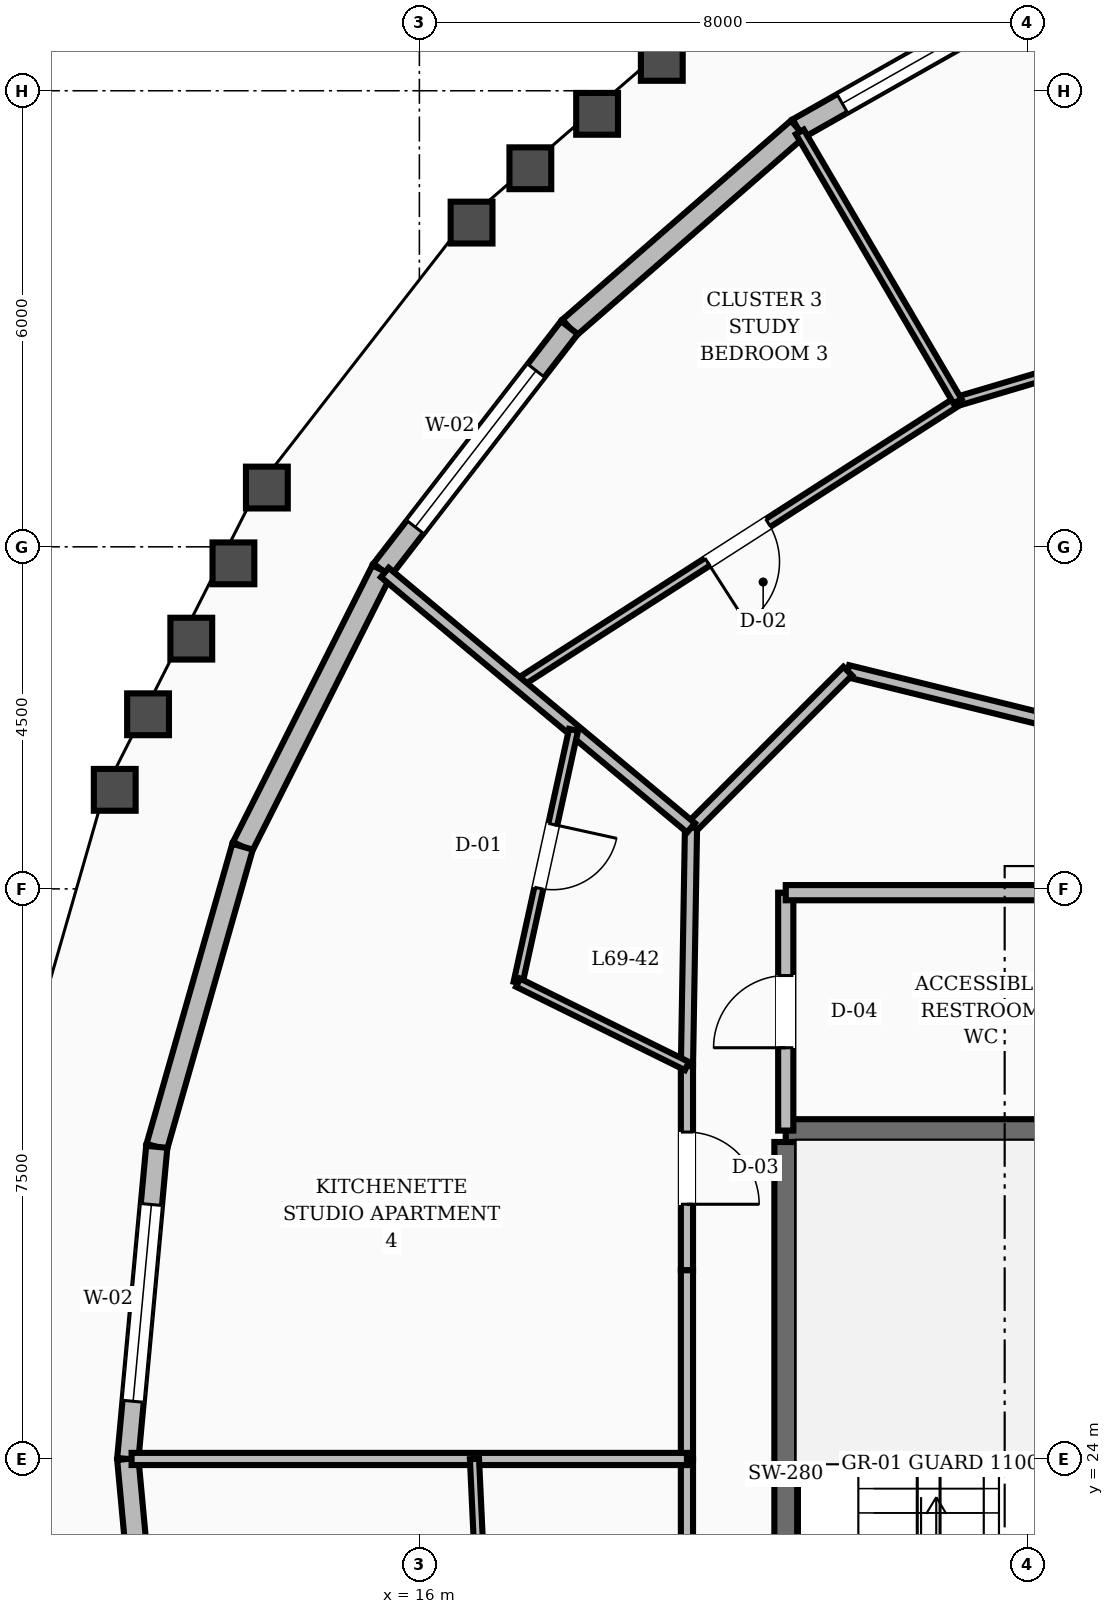
"""IFC4 building model, lengths in metres.
Left out: names, types, materials, properties, quantities, classifications, styles, units other than length and angle.
Written with IfcOpenShell. Run it as: python <this file> out.ifc"""

import sys

from ifc_helpers import new_model, si_unit, direction, frame, frame_2d, origin, place, context, subcontext, project, spatial, rectangle, extrude, element, fill, save


model = new_model("IFC4")
c1 = context("Model", 3, precision=1e-05, world=origin(), true_north=direction((0.0, 1.0)))
c2 = subcontext(c1, "Body", "Model", "MODEL_VIEW")
j1 = project(units=[si_unit("LENGTHUNIT", "METRE"), si_unit("PLANEANGLEUNIT", "RADIAN")], contexts=[c1])
p1 = place(None, origin())
s1 = spatial("IfcSite", under=j1, at=p1, CompositionType="ELEMENT")
p2 = place(p1, origin())
s2 = spatial("IfcBuilding", under=s1, at=p2, CompositionType="ELEMENT")
p3 = place(p2, frame((0.0, 0.0, 265.2)))
s3 = spatial("IfcBuildingStorey", under=s2, at=p3, CompositionType="ELEMENT", Elevation=265.2)
p4 = place(p3, frame((20.82, 19.43, 0.0), z_axis=(0.0, 0.0, 1.0), x_axis=(0.0, 1.0, 0.0)))
e1 = element("IfcWall", 1, at=p4, inside=s3, PredefinedType="SHEAR", context=c2, shape_type="SweptSolid", body=[
    extrude(rectangle(XDim=8.74, YDim=0.3, at=frame_2d((4.37, 0.0))), origin(), (0.0, 0.0, 1.0), 3.6),
])
p5 = place(p3, frame((20.82, 28.32, 0.0), z_axis=(0.0, 0.0, 1.0), x_axis=(1.0, 0.0, 0.0)))
e2 = element("IfcWall", 2, at=p5, inside=s3, PredefinedType="SHEAR", context=c2, shape_type="SweptSolid", body=[
    extrude(rectangle(XDim=3.6, YDim=0.3, at=frame_2d((1.8, 0.0))), origin(), (0.0, 0.0, 1.0), 3.6),
])
p6 = place(p3, frame((24.409, 43.447, 0.0), z_axis=(0.0, 0.0, 1.0), x_axis=(-0.869835312163, -0.49334220346, 0.0)))
e3 = element("IfcWall", 3, at=p6, inside=s3, PredefinedType="STANDARD", context=c2, shape_type="SweptSolid", body=[
    extrude(rectangle(XDim=3.943, YDim=0.28, at=frame_2d((1.971, 0.0))), origin(), (0.0, 0.0, 1.0), 2.88),
])
p7 = place(p6, frame((0.671, 0.0, 0.8)))
e4 = element("IfcOpeningElement", 4, at=p7, cuts=e3, PredefinedType="OPENING", context=c2, shape_type="SweptSolid", body=[
    extrude(rectangle(XDim=2.6, YDim=1.65, at=frame_2d((1.3, 0.825))), frame((0.0, 0.15, 0.0), z_axis=(0.0, -1.0, 0.0), x_axis=(1.0, 0.0, 0.0)), (0.0, 0.0, 1.0), 0.3),
])
p8 = place(p3, frame((20.979, 41.502, 0.0), z_axis=(0.0, 0.0, 1.0), x_axis=(-0.75414910989, -0.656703220681, 0.0)))
e5 = element("IfcWall", 5, at=p8, inside=s3, PredefinedType="STANDARD", context=c2, shape_type="SweptSolid", body=[
    extrude(rectangle(XDim=3.986, YDim=0.28, at=frame_2d((1.993, 0.0))), origin(), (0.0, 0.0, 1.0), 2.88),
])
p9 = place(p3, frame((17.973, 38.884, 0.0), z_axis=(0.0, 0.0, 1.0), x_axis=(-0.611762796107, -0.791041263968, 0.0)))
e6 = element("IfcWall", 6, at=p9, inside=s3, PredefinedType="STANDARD", context=c2, shape_type="SweptSolid", body=[
    extrude(rectangle(XDim=4.032, YDim=0.28, at=frame_2d((2.016, 0.0))), origin(), (0.0, 0.0, 1.0), 2.88),
])
p10 = place(p9, frame((0.716, 0.0, 0.8)))
e7 = element("IfcOpeningElement", 7, at=p10, cuts=e6, PredefinedType="OPENING", context=c2, shape_type="SweptSolid", body=[
    extrude(rectangle(XDim=2.6, YDim=1.65, at=frame_2d((1.3, 0.825))), frame((0.0, 0.15, 0.0), z_axis=(0.0, -1.0, 0.0), x_axis=(1.0, 0.0, 0.0)), (0.0, 0.0, 1.0), 0.3),
])
p11 = place(p3, frame((15.507, 35.694, 0.0), z_axis=(0.0, 0.0, 1.0), x_axis=(-0.449847948813, -0.893105157833, 0.0)))
e8 = element("IfcWall", 8, at=p11, inside=s3, PredefinedType="STANDARD", context=c2, shape_type="SweptSolid", body=[
    extrude(rectangle(XDim=4.075, YDim=0.28, at=frame_2d((2.037, 0.0))), origin(), (0.0, 0.0, 1.0), 2.88),
])
p12 = place(p3, frame((13.674, 32.055, 0.0), z_axis=(0.0, 0.0, 1.0), x_axis=(-0.274823195621, -0.961494779574, 0.0)))
e9 = element("IfcWall", 9, at=p12, inside=s3, PredefinedType="STANDARD", context=c2, shape_type="SweptSolid", body=[
    extrude(rectangle(XDim=4.107, YDim=0.28, at=frame_2d((2.053, 0.0))), origin(), (0.0, 0.0, 1.0), 2.88),
])
p13 = place(p3, frame((12.545, 28.106, 0.0), z_axis=(0.0, 0.0, 1.0), x_axis=(-0.092467769865, -0.995715678061, 0.0)))
e10 = element("IfcWall", 10, at=p13, inside=s3, PredefinedType="STANDARD", context=c2, shape_type="SweptSolid", body=[
    extrude(rectangle(XDim=4.124, YDim=0.28, at=frame_2d((2.062, 0.0))), origin(), (0.0, 0.0, 1.0), 2.88),
])
p14 = place(p13, frame((0.762, 0.0, 0.8)))
e11 = element("IfcOpeningElement", 11, at=p14, cuts=e10, PredefinedType="OPENING", context=c2, shape_type="SweptSolid", body=[
    extrude(rectangle(XDim=2.6, YDim=1.65, at=frame_2d((1.3, 0.825))), frame((0.0, 0.15, 0.0), z_axis=(0.0, -1.0, 0.0), x_axis=(1.0, 0.0, 0.0)), (0.0, 0.0, 1.0), 0.3),
])
p15 = place(p3, frame((12.164, 24.0, 0.0), z_axis=(0.0, 0.0, 1.0), x_axis=(0.092467769865, -0.995715678061, 0.0)))
e12 = element("IfcWall", 12, at=p15, inside=s3, PredefinedType="STANDARD", context=c2, shape_type="SweptSolid", body=[
    extrude(rectangle(XDim=4.124, YDim=0.28, at=frame_2d((2.062, 0.0))), origin(), (0.0, 0.0, 1.0), 2.88),
])
p16 = place(p3, frame((20.82, 28.32, 0.0), z_axis=(0.0, 0.0, 1.0), x_axis=(0.0, 1.0, 0.0)))
e13 = element("IfcWall", 13, at=p16, inside=s3, PredefinedType="SOLIDWALL", context=c2, shape_type="SweptSolid", body=[
    extrude(rectangle(XDim=3.13, YDim=0.2, at=frame_2d((1.565, 0.0))), origin(), (0.0, 0.0, 1.0), 2.87),
])
p17 = place(p16, frame((1.09, 0.0, 0.0)))
e14 = element("IfcOpeningElement", 14, at=p17, cuts=e13, PredefinedType="OPENING", context=c2, shape_type="SweptSolid", body=[
    extrude(rectangle(XDim=0.95, YDim=2.1, at=frame_2d((0.475, 1.05))), frame((0.0, 0.11, 0.0), z_axis=(0.0, -1.0, 0.0), x_axis=(1.0, 0.0, 0.0)), (0.0, 0.0, 1.0), 0.22),
])
p18 = place(p3, frame((20.82, 31.45, 0.0), z_axis=(0.0, 0.0, 1.0), x_axis=(1.0, 0.0, 0.0)))
e15 = element("IfcWall", 15, at=p18, inside=s3, PredefinedType="SOLIDWALL", context=c2, shape_type="SweptSolid", body=[
    extrude(rectangle(XDim=3.98, YDim=0.2, at=frame_2d((1.99, 0.0))), origin(), (0.0, 0.0, 1.0), 2.87),
])
p19 = place(p3, frame((25.752, 33.35, 0.0), z_axis=(0.0, 0.0, 1.0), x_axis=(-0.970939799552, 0.239323850978, 0.0)))
e16 = element("IfcWall", 16, at=p19, inside=s3, PredefinedType="SOLIDWALL", context=c2, shape_type="SweptSolid", body=[
    extrude(rectangle(XDim=4.241, YDim=0.16, at=frame_2d((2.12, 0.0))), origin(), (0.0, 0.0, 1.0), 2.87),
])
p20 = place(p3, frame((21.635, 34.365, 0.0), z_axis=(0.0, 0.0, 1.0), x_axis=(-0.707106781187, -0.707106781187, 0.0)))
e17 = element("IfcWall", 17, at=p20, inside=s3, PredefinedType="SOLIDWALL", context=c2, shape_type="SweptSolid", body=[
    extrude(rectangle(XDim=2.916, YDim=0.16, at=frame_2d((1.458, 0.0))), origin(), (0.0, 0.0, 1.0), 2.87),
])
p21 = place(p3, frame((19.573, 32.303, 0.0), z_axis=(0.0, 0.0, 1.0), x_axis=(-0.016981035134, -0.999855811828, 0.0)))
e18 = element("IfcWall", 18, at=p21, inside=s3, PredefinedType="SOLIDWALL", context=c2, shape_type="SweptSolid", body=[
    extrude(rectangle(XDim=3.134, YDim=0.16, at=frame_2d((1.567, 0.0))), origin(), (0.0, 0.0, 1.0), 2.87),
])
p22 = place(p3, frame((19.52, 29.169, 0.0), z_axis=(0.0, 0.0, 1.0), x_axis=(0.0, -1.0, 0.0)))
e19 = element("IfcWall", 19, at=p22, inside=s3, PredefinedType="SOLIDWALL", context=c2, shape_type="SweptSolid", body=[
    extrude(rectangle(XDim=2.687, YDim=0.16, at=frame_2d((1.344, 0.0))), origin(), (0.0, 0.0, 1.0), 2.87),
])
p23 = place(p22, frame((0.868, 0.0, 0.0)))
e20 = element("IfcOpeningElement", 20, at=p23, cuts=e19, PredefinedType="OPENING", context=c2, shape_type="SweptSolid", body=[
    extrude(rectangle(XDim=0.95, YDim=2.1, at=frame_2d((0.475, 1.05))), frame((0.0, 0.09, 0.0), z_axis=(0.0, -1.0, 0.0), x_axis=(1.0, 0.0, 0.0)), (0.0, 0.0, 1.0), 0.18),
])
for number, where, z_axis, x_axis in (
    (21, (19.52, 26.482, 0.0), (0.0, 0.0, 1.0), (0.0, -1.0, 0.0)),
    (22, (19.52, 24.0, 0.0), (0.0, 0.0, 1.0), (0.0, -1.0, 0.0)),
):
    element("IfcWall", number, at=place(p3, frame(where, z_axis=z_axis, x_axis=x_axis)), inside=s3, PredefinedType="SOLIDWALL", context=c2, shape_type="SweptSolid", body=[
        extrude(rectangle(XDim=2.482, YDim=0.16, at=frame_2d((1.241, 0.0))), origin(), (0.0, 0.0, 1.0), 2.87),
    ])
p24 = place(p3, frame((29.014, 39.675, 0.0), z_axis=(0.0, 0.0, 1.0), x_axis=(-0.958730048682, -0.284317944833, 0.0)))
e23 = element("IfcWall", 23, at=p24, inside=s3, PredefinedType="PARTITIONING", context=c2, shape_type="SweptSolid", body=[
    extrude(rectangle(XDim=6.19, YDim=0.12, at=frame_2d((3.095, 0.0))), origin(), (0.0, 0.0, 1.0), 2.87),
])
p25 = place(p24, frame((2.62, 0.0, 0.0)))
e24 = element("IfcOpeningElement", 24, at=p25, cuts=e23, PredefinedType="OPENING", context=c2, shape_type="SweptSolid", body=[
    extrude(rectangle(XDim=0.95, YDim=2.1, at=frame_2d((0.475, 1.05))), frame((0.0, 0.07, 0.0), z_axis=(0.0, -1.0, 0.0), x_axis=(1.0, 0.0, 0.0)), (0.0, 0.0, 1.0), 0.14),
])
p26 = place(p3, frame((23.08, 37.915, 0.0), z_axis=(0.0, 0.0, 1.0), x_axis=(-0.841538391424, -0.540197311878, 0.0)))
e25 = element("IfcWall", 25, at=p26, inside=s3, PredefinedType="PARTITIONING", context=c2, shape_type="SweptSolid", body=[
    extrude(rectangle(XDim=6.873, YDim=0.12, at=frame_2d((3.437, 0.0))), origin(), (0.0, 0.0, 1.0), 2.87),
])
p27 = place(p26, frame((2.961, 0.0, 0.0)))
e26 = element("IfcOpeningElement", 26, at=p27, cuts=e25, PredefinedType="OPENING", context=c2, shape_type="SweptSolid", body=[
    extrude(rectangle(XDim=0.95, YDim=2.1, at=frame_2d((0.475, 1.05))), frame((0.0, 0.07, 0.0), z_axis=(0.0, -1.0, 0.0), x_axis=(1.0, 0.0, 0.0)), (0.0, 0.0, 1.0), 0.14),
])
p28 = place(p3, frame((23.08, 37.915, 0.0), z_axis=(0.0, 0.0, 1.0), x_axis=(-0.505267765721, 0.862962620814, 0.0)))
e27 = element("IfcWall", 27, at=p28, inside=s3, PredefinedType="PARTITIONING", context=c2, shape_type="SweptSolid", body=[
    extrude(rectangle(XDim=4.106, YDim=0.12, at=frame_2d((2.053, 0.0))), origin(), (0.0, 0.0, 1.0), 2.87),
])
p29 = place(p3, frame((19.573, 32.303, 0.0), z_axis=(0.0, 0.0, 1.0), x_axis=(-0.76801521487, 0.640431596448, 0.0)))
e28 = element("IfcWall", 28, at=p29, inside=s3, PredefinedType="SOLIDWALL", context=c2, shape_type="SweptSolid", body=[
    extrude(rectangle(XDim=5.245, YDim=0.16, at=frame_2d((2.623, 0.0))), origin(), (0.0, 0.0, 1.0), 2.87),
])
p30 = place(p3, frame((18.028, 33.592, 0.0), z_axis=(0.0, 0.0, 1.0), x_axis=(-0.214325537639, -0.976762286289, 0.0)))
e29 = element("IfcWall", 29, at=p30, inside=s3, PredefinedType="PARTITIONING", context=c2, shape_type="SweptSolid", body=[
    extrude(rectangle(XDim=3.405, YDim=0.12, at=frame_2d((1.702, 0.0))), origin(), (0.0, 0.0, 1.0), 2.87),
])
p31 = place(p30, frame((1.272, 0.0, 0.0)))
e30 = element("IfcOpeningElement", 30, at=p31, cuts=e29, PredefinedType="OPENING", context=c2, shape_type="SweptSolid", body=[
    extrude(rectangle(XDim=0.86, YDim=2.1, at=frame_2d((0.43, 1.05))), frame((0.0, 0.07, 0.0), z_axis=(0.0, -1.0, 0.0), x_axis=(1.0, 0.0, 0.0)), (0.0, 0.0, 1.0), 0.14),
])
p32 = place(p3, frame((19.52, 29.169, 0.0), z_axis=(0.0, 0.0, 1.0), x_axis=(-0.896701601093, 0.442635559572, 0.0)))
e31 = element("IfcWall", 31, at=p32, inside=s3, PredefinedType="PARTITIONING", context=c2, shape_type="SweptSolid", body=[
    extrude(rectangle(XDim=2.478, YDim=0.12, at=frame_2d((1.239, 0.0))), origin(), (0.0, 0.0, 1.0), 2.87),
])
p33 = place(p3, frame((19.52, 24.0, 0.0), z_axis=(0.0, 0.0, 1.0), x_axis=(-1.0, 0.0, 0.0)))
e32 = element("IfcWall", 32, at=p33, inside=s3, PredefinedType="SOLIDWALL", context=c2, shape_type="SweptSolid", body=[
    extrude(rectangle(XDim=7.306, YDim=0.16, at=frame_2d((3.653, 0.0))), origin(), (0.0, 0.0, 1.0), 2.87),
])
p34 = place(p3, frame((16.725, 24.0, 0.0), z_axis=(0.0, 0.0, 1.0), x_axis=(0.046656758932, -0.998910980441, 0.0)))
e33 = element("IfcWall", 33, at=p34, inside=s3, PredefinedType="PARTITIONING", context=c2, shape_type="SweptSolid", body=[
    extrude(rectangle(XDim=3.103, YDim=0.12, at=frame_2d((1.552, 0.0))), origin(), (0.0, 0.0, 1.0), 2.87),
])
p35 = place(p34, frame((1.122, 0.0, 0.0)))
e34 = element("IfcOpeningElement", 34, at=p35, cuts=e33, PredefinedType="OPENING", context=c2, shape_type="SweptSolid", body=[
    extrude(rectangle(XDim=0.86, YDim=2.1, at=frame_2d((0.43, 1.05))), frame((0.0, 0.07, 0.0), z_axis=(0.0, -1.0, 0.0), x_axis=(1.0, 0.0, 0.0)), (0.0, 0.0, 1.0), 0.14),
])
p36 = place(p7, origin())
e35 = element("IfcWindow", 35, at=p36, inside=s3, PartitioningType="SINGLE_PANEL", PredefinedType="WINDOW", context=c2, shape_type="SweptSolid", body=[
    extrude(rectangle(XDim=2.6, YDim=1.65, at=frame_2d((1.3, 0.825))), frame((0.0, 0.03, 0.0), z_axis=(0.0, -1.0, 0.0), x_axis=(1.0, 0.0, 0.0)), (0.0, 0.0, 1.0), 0.06),
])
fill(e4, e35)
p37 = place(p10, origin())
e36 = element("IfcWindow", 36, at=p37, inside=s3, PartitioningType="SINGLE_PANEL", PredefinedType="WINDOW", context=c2, shape_type="SweptSolid", body=[
    extrude(rectangle(XDim=2.6, YDim=1.65, at=frame_2d((1.3, 0.825))), frame((0.0, 0.03, 0.0), z_axis=(0.0, -1.0, 0.0), x_axis=(1.0, 0.0, 0.0)), (0.0, 0.0, 1.0), 0.06),
])
fill(e7, e36)
p38 = place(p14, origin())
e37 = element("IfcWindow", 37, at=p38, inside=s3, PartitioningType="SINGLE_PANEL", PredefinedType="WINDOW", context=c2, shape_type="SweptSolid", body=[
    extrude(rectangle(XDim=2.6, YDim=1.65, at=frame_2d((1.3, 0.825))), frame((0.0, 0.03, 0.0), z_axis=(0.0, -1.0, 0.0), x_axis=(1.0, 0.0, 0.0)), (0.0, 0.0, 1.0), 0.06),
])
fill(e11, e37)
p39 = place(p17, origin())
e38 = element("IfcDoor", 38, at=p39, inside=s3, OperationType="SINGLE_SWING_LEFT", PredefinedType="DOOR", context=c2, shape_type="SweptSolid", body=[
    extrude(rectangle(XDim=0.95, YDim=2.1, at=frame_2d((0.475, 1.05))), frame((0.0, 0.025, 0.0), z_axis=(0.0, -1.0, 0.0), x_axis=(1.0, 0.0, 0.0)), (0.0, 0.0, 1.0), 0.05),
])
fill(e14, e38)
p40 = place(p27, origin())
e39 = element("IfcDoor", 39, at=p40, inside=s3, OperationType="SINGLE_SWING_RIGHT", PredefinedType="DOOR", context=c2, shape_type="SweptSolid", body=[
    extrude(rectangle(XDim=0.95, YDim=2.1, at=frame_2d((0.475, 1.05))), frame((0.0, 0.025, 0.0), z_axis=(0.0, -1.0, 0.0), x_axis=(1.0, 0.0, 0.0)), (0.0, 0.0, 1.0), 0.05),
])
fill(e26, e39)
p41 = place(p31, origin())
e40 = element("IfcDoor", 40, at=p41, inside=s3, OperationType="SINGLE_SWING_LEFT", PredefinedType="DOOR", context=c2, shape_type="SweptSolid", body=[
    extrude(rectangle(XDim=0.86, YDim=2.1, at=frame_2d((0.43, 1.05))), frame((0.0, 0.025, 0.0), z_axis=(0.0, -1.0, 0.0), x_axis=(1.0, 0.0, 0.0)), (0.0, 0.0, 1.0), 0.05),
])
fill(e30, e40)
p42 = place(p23, origin())
e41 = element("IfcDoor", 41, at=p42, inside=s3, OperationType="SINGLE_SWING_RIGHT", PredefinedType="DOOR", context=c2, shape_type="SweptSolid", body=[
    extrude(rectangle(XDim=0.95, YDim=2.1, at=frame_2d((0.475, 1.05))), frame((0.0, 0.025, 0.0), z_axis=(0.0, -1.0, 0.0), x_axis=(1.0, 0.0, 0.0)), (0.0, 0.0, 1.0), 0.05),
])
fill(e20, e41)
save(model, sys.argv[1])
